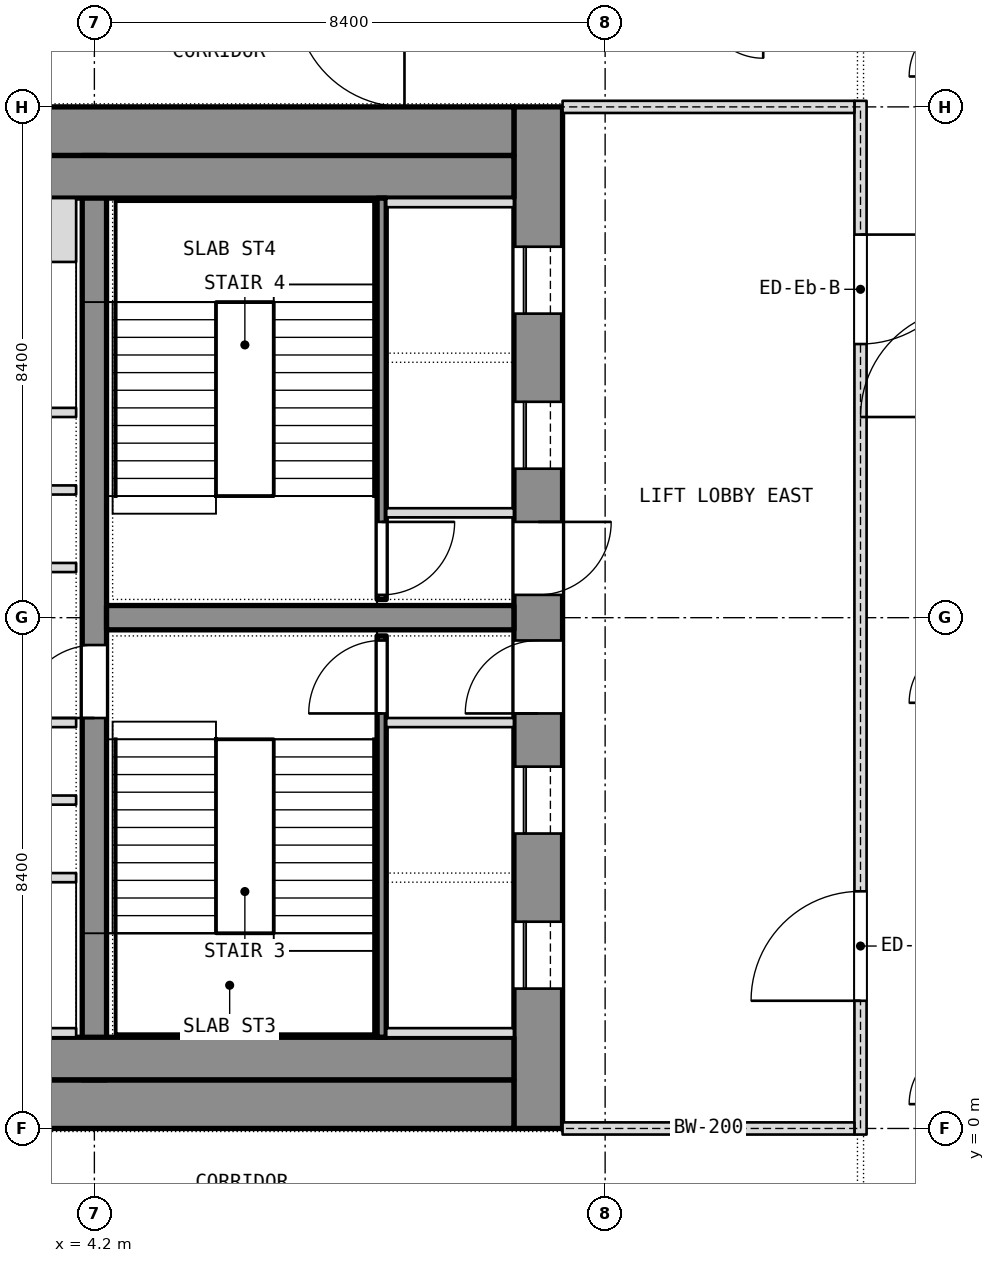
"""IFC4 building model, lengths in metres.
Left out: names, types, materials, properties, quantities, classifications, styles, units other than length and angle.
Written with IfcOpenShell. Run it as: python <this file> out.ifc"""

import sys

from ifc_helpers import new_model, si_unit, direction, frame, frame_2d, origin, place, context, subcontext, project, spatial, rectangle, extrude, element, fill, save


model = new_model("IFC4")
c1 = context("Model", 3, precision=1e-05, world=origin(), true_north=direction((0.0, 1.0)))
c2 = subcontext(c1, "Body", "Model", "MODEL_VIEW")
j1 = project(units=[si_unit("LENGTHUNIT", "METRE"), si_unit("PLANEANGLEUNIT", "RADIAN")], contexts=[c1])
p1 = place(None, origin())
s1 = spatial("IfcSite", under=j1, at=p1, CompositionType="ELEMENT")
p2 = place(p1, origin())
s2 = spatial("IfcBuilding", under=s1, at=p2, CompositionType="ELEMENT")
p3 = place(p2, frame((0.0, 0.0, 191.3)))
s3 = spatial("IfcBuildingStorey", under=s2, at=p3, CompositionType="ELEMENT", Elevation=191.3)
p4 = place(p3, frame((11.5, 0.0, 0.0), z_axis=(0.0, 0.0, 1.0), x_axis=(0.0, 1.0, 0.0)))
e1 = element("IfcWall", 1, at=p4, inside=s3, PredefinedType="SHEAR", context=c2, shape_type="SweptSolid", body=[
    extrude(rectangle(XDim=16.8, YDim=0.8, at=frame_2d((8.4, 0.0))), origin(), (0.0, 0.0, 1.0), 3.6),
])
p5 = place(p4, frame((2.3, 0.0, 0.0)))
e2 = element("IfcOpeningElement", 2, at=p5, cuts=e1, PredefinedType="OPENING", context=c2, shape_type="SweptSolid", body=[
    extrude(rectangle(XDim=1.1, YDim=2.1, at=frame_2d((0.55, 1.05))), frame((0.0, 0.4, 0.0), z_axis=(0.0, -1.0, 0.0), x_axis=(1.0, 0.0, 0.0)), (0.0, 0.0, 1.0), 0.8),
])
p6 = place(p4, frame((4.85, 0.0, 0.0)))
e3 = element("IfcOpeningElement", 3, at=p6, cuts=e1, PredefinedType="OPENING", context=c2, shape_type="SweptSolid", body=[
    extrude(rectangle(XDim=1.1, YDim=2.1, at=frame_2d((0.55, 1.05))), frame((0.0, 0.4, 0.0), z_axis=(0.0, -1.0, 0.0), x_axis=(1.0, 0.0, 0.0)), (0.0, 0.0, 1.0), 0.8),
])
p7 = place(p4, frame((6.825, 0.0, 0.0)))
e4 = element("IfcOpeningElement", 4, at=p7, cuts=e1, PredefinedType="OPENING", context=c2, shape_type="SweptSolid", body=[
    extrude(rectangle(XDim=1.2, YDim=2.1, at=frame_2d((0.6, 1.05))), frame((0.0, 0.4, 0.0), z_axis=(0.0, -1.0, 0.0), x_axis=(1.0, 0.0, 0.0)), (0.0, 0.0, 1.0), 0.8),
])
p8 = place(p4, frame((13.4, 0.0, 0.0)))
e5 = element("IfcOpeningElement", 5, at=p8, cuts=e1, PredefinedType="OPENING", context=c2, shape_type="SweptSolid", body=[
    extrude(rectangle(XDim=1.1, YDim=2.1, at=frame_2d((0.55, 1.05))), frame((0.0, 0.4, 0.0), z_axis=(0.0, -1.0, 0.0), x_axis=(1.0, 0.0, 0.0)), (0.0, 0.0, 1.0), 0.8),
])
p9 = place(p4, frame((10.85, 0.0, 0.0)))
e6 = element("IfcOpeningElement", 6, at=p9, cuts=e1, PredefinedType="OPENING", context=c2, shape_type="SweptSolid", body=[
    extrude(rectangle(XDim=1.1, YDim=2.1, at=frame_2d((0.55, 1.05))), frame((0.0, 0.4, 0.0), z_axis=(0.0, -1.0, 0.0), x_axis=(1.0, 0.0, 0.0)), (0.0, 0.0, 1.0), 0.8),
])
p10 = place(p4, frame((8.775, 0.0, 0.0)))
e7 = element("IfcOpeningElement", 7, at=p10, cuts=e1, PredefinedType="OPENING", context=c2, shape_type="SweptSolid", body=[
    extrude(rectangle(XDim=1.2, YDim=2.1, at=frame_2d((0.6, 1.05))), frame((0.0, 0.4, 0.0), z_axis=(0.0, -1.0, 0.0), x_axis=(1.0, 0.0, 0.0)), (0.0, 0.0, 1.0), 0.8),
])
for number, where, z_axis, x_axis in (
    (8, (-11.1, 0.4, 0.0), (0.0, 0.0, 1.0), (1.0, 0.0, 0.0)),
    (9, (-11.1, 16.4, 0.0), (0.0, 0.0, 1.0), (1.0, 0.0, 0.0)),
):
    element("IfcWall", number, at=place(p3, frame(where, z_axis=z_axis, x_axis=x_axis)), inside=s3, PredefinedType="SHEAR", context=c2, shape_type="SweptSolid", body=[
        extrude(rectangle(XDim=22.2, YDim=0.8, at=frame_2d((11.1, 0.0))), origin(), (0.0, 0.0, 1.0), 3.6),
    ])
p11 = place(p3, frame((4.2, 0.8, 0.0), z_axis=(0.0, 0.0, 1.0), x_axis=(0.0, 1.0, 0.0)))
e10 = element("IfcWall", 10, at=p11, inside=s3, PredefinedType="SHEAR", context=c2, shape_type="SweptSolid", body=[
    extrude(rectangle(XDim=15.2, YDim=0.4, at=frame_2d((7.6, 0.0))), origin(), (0.0, 0.0, 1.0), 3.6),
])
p12 = place(p11, frame((5.95, 0.0, 0.0)))
e11 = element("IfcOpeningElement", 11, at=p12, cuts=e10, PredefinedType="OPENING", context=c2, shape_type="SweptSolid", body=[
    extrude(rectangle(XDim=1.2, YDim=2.1, at=frame_2d((0.6, 1.05))), frame((0.0, 0.2, 0.0), z_axis=(0.0, -1.0, 0.0), x_axis=(1.0, 0.0, 0.0)), (0.0, 0.0, 1.0), 0.4),
])
p13 = place(p3, frame((4.4, 8.4, 0.0), z_axis=(0.0, 0.0, 1.0), x_axis=(1.0, 0.0, 0.0)))
e12 = element("IfcWall", 12, at=p13, inside=s3, PredefinedType="SHEAR", context=c2, shape_type="SweptSolid", body=[
    extrude(rectangle(XDim=6.7, YDim=0.4, at=frame_2d((3.35, 0.0))), origin(), (0.0, 0.0, 1.0), 3.6),
])
for number, where, z_axis, x_axis in (
    (13, (-11.1, 1.15, 0.0), (0.0, 0.0, 1.0), (1.0, 0.0, 0.0)),
    (14, (-11.1, 15.65, 0.0), (0.0, 0.0, 1.0), (1.0, 0.0, 0.0)),
):
    element("IfcWall", number, at=place(p3, frame(where, z_axis=z_axis, x_axis=x_axis)), inside=s3, PredefinedType="PARTITIONING", context=c2, shape_type="SweptSolid", body=[
        extrude(rectangle(XDim=22.2, YDim=0.7, at=frame_2d((11.1, 0.0))), origin(), (0.0, 0.0, 1.0), 3.34),
    ])
p14 = place(p3, frame((8.925, 1.5, 0.0), z_axis=(0.0, 0.0, 1.0), x_axis=(0.0, 1.0, 0.0)))
e15 = element("IfcWall", 15, at=p14, inside=s3, PredefinedType="SHEAR", context=c2, shape_type="SweptSolid", body=[
    extrude(rectangle(XDim=6.6, YDim=0.15, at=frame_2d((3.3, 0.0))), origin(), (0.0, 0.0, 1.0), 3.34),
])
p15 = place(p14, frame((5.325, 0.0, 0.0)))
e16 = element("IfcOpeningElement", 16, at=p15, cuts=e15, PredefinedType="OPENING", context=c2, shape_type="SweptSolid", body=[
    extrude(rectangle(XDim=1.2, YDim=2.1, at=frame_2d((0.6, 1.05))), frame((0.0, 0.075, 0.0), z_axis=(0.0, -1.0, 0.0), x_axis=(1.0, 0.0, 0.0)), (0.0, 0.0, 1.0), 0.15),
])
for number, where, z_axis, x_axis in (
    (17, (9.0, 6.675, 0.0), (0.0, 0.0, 1.0), (1.0, 0.0, 0.0)),
    (18, (9.0, 1.575, 0.0), (0.0, 0.0, 1.0), (1.0, 0.0, 0.0)),
):
    element("IfcWall", number, at=place(p3, frame(where, z_axis=z_axis, x_axis=x_axis)), inside=s3, PredefinedType="SHEAR", context=c2, shape_type="SweptSolid", body=[
        extrude(rectangle(XDim=2.1, YDim=0.15, at=frame_2d((1.05, 0.0))), origin(), (0.0, 0.0, 1.0), 3.6),
    ])
p16 = place(p3, frame((8.925, 8.7, 0.0), z_axis=(0.0, 0.0, 1.0), x_axis=(0.0, 1.0, 0.0)))
e19 = element("IfcWall", 19, at=p16, inside=s3, PredefinedType="SHEAR", context=c2, shape_type="SweptSolid", body=[
    extrude(rectangle(XDim=6.6, YDim=0.15, at=frame_2d((3.3, 0.0))), origin(), (0.0, 0.0, 1.0), 3.34),
])
p17 = place(p16, frame((0.075, 0.0, 0.0)))
e20 = element("IfcOpeningElement", 20, at=p17, cuts=e19, PredefinedType="OPENING", context=c2, shape_type="SweptSolid", body=[
    extrude(rectangle(XDim=1.2, YDim=2.1, at=frame_2d((0.6, 1.05))), frame((0.0, 0.075, 0.0), z_axis=(0.0, -1.0, 0.0), x_axis=(1.0, 0.0, 0.0)), (0.0, 0.0, 1.0), 0.15),
])
for number, where, z_axis, x_axis in (
    (21, (9.0, 10.125, 0.0), (0.0, 0.0, 1.0), (1.0, 0.0, 0.0)),
    (22, (9.0, 15.225, 0.0), (0.0, 0.0, 1.0), (1.0, 0.0, 0.0)),
):
    element("IfcWall", number, at=place(p3, frame(where, z_axis=z_axis, x_axis=x_axis)), inside=s3, PredefinedType="SHEAR", context=c2, shape_type="SweptSolid", body=[
        extrude(rectangle(XDim=2.1, YDim=0.15, at=frame_2d((1.05, 0.0))), origin(), (0.0, 0.0, 1.0), 3.6),
    ])
p18 = place(p3, frame((-3.9, 4.125, 0.0), z_axis=(0.0, 0.0, 1.0), x_axis=(1.0, 0.0, 0.0)))
e23 = element("IfcWall", 23, at=p18, inside=s3, PredefinedType="PARTITIONING", context=c2, shape_type="SweptSolid", body=[
    extrude(rectangle(XDim=7.8, YDim=0.15, at=frame_2d((3.9, 0.0))), origin(), (0.0, 0.0, 1.0), 3.34),
])
p19 = place(p18, frame((3.75, 0.0, 0.0)))
e24 = element("IfcOpeningElement", 24, at=p19, cuts=e23, PredefinedType="OPENING", context=c2, shape_type="SweptSolid", body=[
    extrude(rectangle(XDim=1.2, YDim=2.1, at=frame_2d((0.6, 1.05))), frame((0.0, 0.075, 0.0), z_axis=(0.0, -1.0, 0.0), x_axis=(1.0, 0.0, 0.0)), (0.0, 0.0, 1.0), 0.15),
])
p20 = place(p3, frame((-3.9, 11.775, 0.0), z_axis=(0.0, 0.0, 1.0), x_axis=(1.0, 0.0, 0.0)))
e25 = element("IfcWall", 25, at=p20, inside=s3, PredefinedType="PARTITIONING", context=c2, shape_type="SweptSolid", body=[
    extrude(rectangle(XDim=7.8, YDim=0.15, at=frame_2d((3.9, 0.0))), origin(), (0.0, 0.0, 1.0), 3.34),
])
p21 = place(p20, frame((3.3, 0.0, 0.0)))
e26 = element("IfcOpeningElement", 26, at=p21, cuts=e25, PredefinedType="OPENING", context=c2, shape_type="SweptSolid", body=[
    extrude(rectangle(XDim=1.2, YDim=2.1, at=frame_2d((0.6, 1.05))), frame((0.0, 0.075, 0.0), z_axis=(0.0, -1.0, 0.0), x_axis=(1.0, 0.0, 0.0)), (0.0, 0.0, 1.0), 0.15),
])
p22 = place(p3, frame((1.65, 1.575, 0.0), z_axis=(0.0, 0.0, 1.0), x_axis=(1.0, 0.0, 0.0)))
e27 = element("IfcWall", 27, at=p22, inside=s3, PredefinedType="SHEAR", context=c2, shape_type="SweptSolid", body=[
    extrude(rectangle(XDim=2.25, YDim=0.15, at=frame_2d((1.125, 0.0))), origin(), (0.0, 0.0, 1.0), 3.6),
])
p23 = place(p3, frame((1.65, 14.775, 0.0), z_axis=(0.0, 0.0, 1.0), x_axis=(1.0, 0.0, 0.0)))
e28 = element("IfcWall", 28, at=p23, inside=s3, PredefinedType="SHEAR", context=c2, shape_type="SweptSolid", body=[
    extrude(rectangle(XDim=2.25, YDim=1.05, at=frame_2d((1.125, 0.0))), origin(), (0.0, 0.0, 1.0), 3.6),
])
for number, where, z_axis, x_axis in (
    (29, (1.65, 6.675, 0.0), (0.0, 0.0, 1.0), (1.0, 0.0, 0.0)),
    (30, (1.65, 9.225, 0.0), (0.0, 0.0, 1.0), (1.0, 0.0, 0.0)),
):
    element("IfcWall", number, at=place(p3, frame(where, z_axis=z_axis, x_axis=x_axis)), inside=s3, PredefinedType="PARTITIONING", context=c2, shape_type="SweptSolid", body=[
        extrude(rectangle(XDim=2.25, YDim=0.15, at=frame_2d((1.125, 0.0))), origin(), (0.0, 0.0, 1.0), 3.34),
    ])
for number, where, z_axis, x_axis in (
    (31, (1.8, 5.4, 0.0), (0.0, 0.0, 1.0), (1.0, 0.0, 0.0)),
    (32, (1.8, 10.5, 0.0), (0.0, 0.0, 1.0), (1.0, 0.0, 0.0)),
):
    element("IfcWall", number, at=place(p3, frame(where, z_axis=z_axis, x_axis=x_axis)), inside=s3, PredefinedType="PARTITIONING", context=c2, shape_type="SweptSolid", body=[
        extrude(rectangle(XDim=2.1, YDim=0.15, at=frame_2d((1.05, 0.0))), origin(), (0.0, 0.0, 1.0), 3.34),
    ])
p24 = place(p3, frame((16.8, -0.1, 0.0), z_axis=(0.0, 0.0, 1.0), x_axis=(0.0, 1.0, 0.0)))
e33 = element("IfcWall", 33, at=p24, inside=s3, PredefinedType="PARTITIONING", context=c2, shape_type="SweptSolid", body=[
    extrude(rectangle(XDim=17.0, YDim=0.2, at=frame_2d((8.5, 0.0))), origin(), (0.0, 0.0, 1.0), 3.34),
])
p25 = place(p24, frame((2.2, 0.0, 0.0)))
e34 = element("IfcOpeningElement", 34, at=p25, cuts=e33, PredefinedType="OPENING", context=c2, shape_type="SweptSolid", body=[
    extrude(rectangle(XDim=1.8, YDim=2.1, at=frame_2d((0.9, 1.05))), frame((0.0, 0.1, 0.0), z_axis=(0.0, -1.0, 0.0), x_axis=(1.0, 0.0, 0.0)), (0.0, 0.0, 1.0), 0.2),
])
p26 = place(p24, frame((13.0, 0.0, 0.0)))
e35 = element("IfcOpeningElement", 35, at=p26, cuts=e33, PredefinedType="OPENING", context=c2, shape_type="SweptSolid", body=[
    extrude(rectangle(XDim=1.8, YDim=2.1, at=frame_2d((0.9, 1.05))), frame((0.0, 0.1, 0.0), z_axis=(0.0, -1.0, 0.0), x_axis=(1.0, 0.0, 0.0)), (0.0, 0.0, 1.0), 0.2),
])
for number, where, z_axis, x_axis in (
    (36, (11.9, 0.0, 0.0), (0.0, 0.0, 1.0), (1.0, 0.0, 0.0)),
    (37, (11.9, 16.8, 0.0), (0.0, 0.0, 1.0), (1.0, 0.0, 0.0)),
):
    element("IfcWall", number, at=place(p3, frame(where, z_axis=z_axis, x_axis=x_axis)), inside=s3, PredefinedType="PARTITIONING", context=c2, shape_type="SweptSolid", body=[
        extrude(rectangle(XDim=4.8, YDim=0.2, at=frame_2d((2.4, 0.0))), origin(), (0.0, 0.0, 1.0), 2.94),
    ])
p27 = place(p5, origin())
e38 = element("IfcDoor", 38, at=p27, inside=s3, OperationType="SLIDING_TO_LEFT", PredefinedType="DOOR", context=c2, shape_type="SweptSolid", body=[
    extrude(rectangle(XDim=1.1, YDim=2.1, at=frame_2d((0.55, 1.05))), frame((0.0, 0.025, 0.0), z_axis=(0.0, -1.0, 0.0), x_axis=(1.0, 0.0, 0.0)), (0.0, 0.0, 1.0), 0.05),
])
fill(e2, e38)
p28 = place(p6, origin())
e39 = element("IfcDoor", 39, at=p28, inside=s3, OperationType="SLIDING_TO_LEFT", PredefinedType="DOOR", context=c2, shape_type="SweptSolid", body=[
    extrude(rectangle(XDim=1.1, YDim=2.1, at=frame_2d((0.55, 1.05))), frame((0.0, 0.025, 0.0), z_axis=(0.0, -1.0, 0.0), x_axis=(1.0, 0.0, 0.0)), (0.0, 0.0, 1.0), 0.05),
])
fill(e3, e39)
p29 = place(p7, origin())
e40 = element("IfcDoor", 40, at=p29, inside=s3, OperationType="SINGLE_SWING_LEFT", PredefinedType="DOOR", context=c2, shape_type="SweptSolid", body=[
    extrude(rectangle(XDim=1.2, YDim=2.1, at=frame_2d((0.6, 1.05))), frame((0.0, 0.025, 0.0), z_axis=(0.0, -1.0, 0.0), x_axis=(1.0, 0.0, 0.0)), (0.0, 0.0, 1.0), 0.05),
])
fill(e4, e40)
p30 = place(p15, origin())
e41 = element("IfcDoor", 41, at=p30, inside=s3, OperationType="SINGLE_SWING_LEFT", PredefinedType="DOOR", context=c2, shape_type="SweptSolid", body=[
    extrude(rectangle(XDim=1.2, YDim=2.1, at=frame_2d((0.6, 1.05))), frame((0.0, 0.025, 0.0), z_axis=(0.0, -1.0, 0.0), x_axis=(1.0, 0.0, 0.0)), (0.0, 0.0, 1.0), 0.05),
])
fill(e16, e41)
p31 = place(p8, origin())
e42 = element("IfcDoor", 42, at=p31, inside=s3, OperationType="SLIDING_TO_LEFT", PredefinedType="DOOR", context=c2, shape_type="SweptSolid", body=[
    extrude(rectangle(XDim=1.1, YDim=2.1, at=frame_2d((0.55, 1.05))), frame((0.0, 0.025, 0.0), z_axis=(0.0, -1.0, 0.0), x_axis=(1.0, 0.0, 0.0)), (0.0, 0.0, 1.0), 0.05),
])
fill(e5, e42)
p32 = place(p9, origin())
e43 = element("IfcDoor", 43, at=p32, inside=s3, OperationType="SLIDING_TO_LEFT", PredefinedType="DOOR", context=c2, shape_type="SweptSolid", body=[
    extrude(rectangle(XDim=1.1, YDim=2.1, at=frame_2d((0.55, 1.05))), frame((0.0, 0.025, 0.0), z_axis=(0.0, -1.0, 0.0), x_axis=(1.0, 0.0, 0.0)), (0.0, 0.0, 1.0), 0.05),
])
fill(e6, e43)
p33 = place(p10, origin())
e44 = element("IfcDoor", 44, at=p33, inside=s3, OperationType="SINGLE_SWING_LEFT", PredefinedType="DOOR", context=c2, shape_type="SweptSolid", body=[
    extrude(rectangle(XDim=1.2, YDim=2.1, at=frame_2d((0.6, 1.05))), frame((0.0, 0.025, 0.0), z_axis=(0.0, -1.0, 0.0), x_axis=(1.0, 0.0, 0.0)), (0.0, 0.0, 1.0), 0.05),
])
fill(e7, e44)
p34 = place(p17, origin())
e45 = element("IfcDoor", 45, at=p34, inside=s3, OperationType="SINGLE_SWING_LEFT", PredefinedType="DOOR", context=c2, shape_type="SweptSolid", body=[
    extrude(rectangle(XDim=1.2, YDim=2.1, at=frame_2d((0.6, 1.05))), frame((0.0, 0.025, 0.0), z_axis=(0.0, -1.0, 0.0), x_axis=(1.0, 0.0, 0.0)), (0.0, 0.0, 1.0), 0.05),
])
fill(e20, e45)
p35 = place(p12, origin())
e46 = element("IfcDoor", 46, at=p35, inside=s3, OperationType="SINGLE_SWING_LEFT", PredefinedType="DOOR", context=c2, shape_type="SweptSolid", body=[
    extrude(rectangle(XDim=1.2, YDim=2.1, at=frame_2d((0.6, 1.05))), frame((0.0, 0.025, 0.0), z_axis=(0.0, -1.0, 0.0), x_axis=(1.0, 0.0, 0.0)), (0.0, 0.0, 1.0), 0.05),
])
fill(e11, e46)
p36 = place(p25, origin())
e47 = element("IfcDoor", 47, at=p36, inside=s3, OperationType="DOUBLE_DOOR_SINGLE_SWING", PredefinedType="DOOR", context=c2, shape_type="SweptSolid", body=[
    extrude(rectangle(XDim=1.8, YDim=2.1, at=frame_2d((0.9, 1.05))), frame((0.0, 0.025, 0.0), z_axis=(0.0, -1.0, 0.0), x_axis=(1.0, 0.0, 0.0)), (0.0, 0.0, 1.0), 0.05),
])
fill(e34, e47)
p37 = place(p26, origin())
e48 = element("IfcDoor", 48, at=p37, inside=s3, OperationType="DOUBLE_DOOR_SINGLE_SWING", PredefinedType="DOOR", context=c2, shape_type="SweptSolid", body=[
    extrude(rectangle(XDim=1.8, YDim=2.1, at=frame_2d((0.9, 1.05))), frame((0.0, 0.025, 0.0), z_axis=(0.0, -1.0, 0.0), x_axis=(1.0, 0.0, 0.0)), (0.0, 0.0, 1.0), 0.05),
])
fill(e35, e48)
save(model, sys.argv[1])
